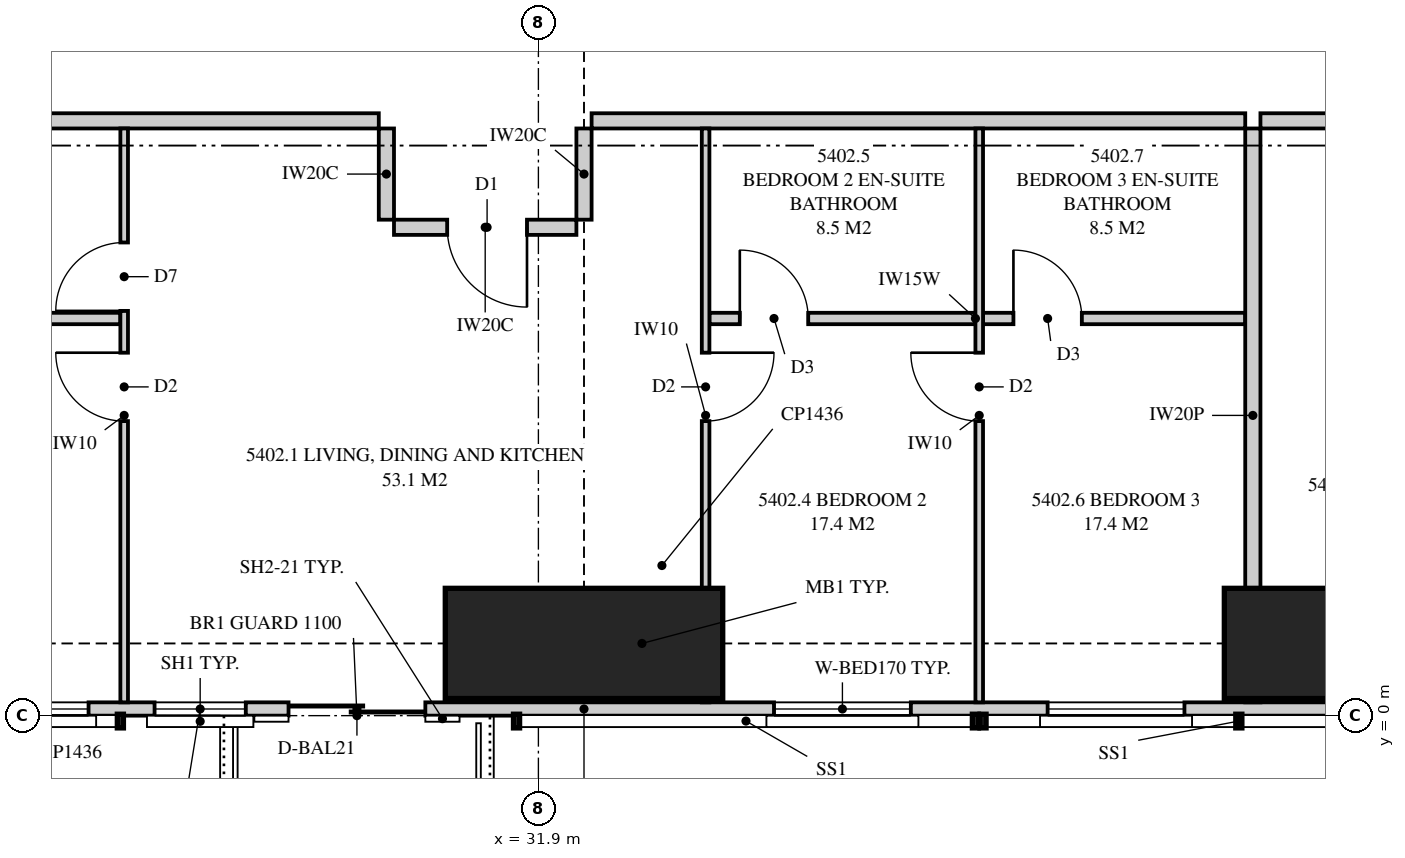
"""IFC4 building model, lengths in metres.
Left out: names, types, materials, properties, quantities, classifications, styles, units other than length and angle.
Written with IfcOpenShell. Run it as: python <this file> out.ifc"""

import sys

from ifc_helpers import new_model, si_unit, direction, frame, frame_2d, origin, origin_2d, place, context, subcontext, project, spatial, polyline, rectangle, outline, extrude, element, fill, save


model = new_model("IFC4")
c1 = context("Model", 3, precision=1e-05, world=origin(), true_north=direction((0.0, 1.0)))
c2 = subcontext(c1, "Body", "Model", "MODEL_VIEW")
j1 = project(units=[si_unit("LENGTHUNIT", "METRE"), si_unit("PLANEANGLEUNIT", "RADIAN")], contexts=[c1])
p1 = place(None, origin())
s1 = spatial("IfcSite", under=j1, at=p1, CompositionType="ELEMENT")
p2 = place(p1, origin())
s2 = spatial("IfcBuilding", under=s1, at=p2, CompositionType="ELEMENT")
p3 = place(p2, frame((0.0, 0.0, 197.9)))
s3 = spatial("IfcBuildingStorey", under=s2, at=p3, CompositionType="ELEMENT", Elevation=197.9)
for number, where, z_axis, x_axis in (
    (1, (32.5, 0.95, 0.0), (0.0, 0.0, 1.0), (0.0, 1.0, 0.0)),
    (2, (42.75, 0.95, 0.0), (0.0, 0.0, 1.0), (0.0, 1.0, 0.0)),
):
    element("IfcColumn", number, at=place(p3, frame(where, z_axis=z_axis, x_axis=x_axis)), inside=s3, PredefinedType="COLUMN", context=c2, shape_type="SweptSolid", body=[
        extrude(rectangle(XDim=1.45, YDim=3.65, at=origin_2d()), origin(), (0.0, 0.0, 1.0), 3.35),
    ])
p4 = place(p3, frame((15.051, 0.087, 0.0), z_axis=(0.0, 0.0, 1.0), x_axis=(1.0, 0.0, 0.0)))
e3 = element("IfcWall", 3, at=p4, inside=s3, PredefinedType="SOLIDWALL", context=c2, shape_type="SweptSolid", body=[
    extrude(outline(polyline([(0.0, 0.0), (34.897, 0.0), (34.897, 3.11), (27.91, 3.11), (27.91, 2.15), (27.836, 2.15), (27.836, 3.11), (27.699, 3.11), (27.699, 2.15), (7.199, 2.15), (7.199, 3.11), (7.062, 3.11), (7.062, 2.15), (6.987, 2.15), (6.987, 3.11), (0.0, 3.11), (0.0, 0.0)])), frame((0.0, 0.087, 0.0), z_axis=(0.0, -1.0, 0.0), x_axis=(1.0, 0.0, 0.0)), (0.0, 0.0, 1.0), 0.175),
])
p5 = place(p4, frame((0.613, 0.0, 0.4)))
e4 = element("IfcOpeningElement", 4, at=p5, cuts=e3, PredefinedType="OPENING", context=c2, shape_type="SweptSolid", body=[
    extrude(rectangle(XDim=1.2, YDim=1.7, at=frame_2d((0.6, 0.85))), frame((0.0, 0.097, 0.0), z_axis=(0.0, -1.0, 0.0), x_axis=(1.0, 0.0, 0.0)), (0.0, 0.0, 1.0), 0.195),
])
p6 = place(p4, frame((3.349, 0.0, 0.4)))
e5 = element("IfcOpeningElement", 5, at=p6, cuts=e3, PredefinedType="OPENING", context=c2, shape_type="SweptSolid", body=[
    extrude(rectangle(XDim=1.8, YDim=1.7, at=frame_2d((0.9, 0.85))), frame((0.0, 0.097, 0.0), z_axis=(0.0, -1.0, 0.0), x_axis=(1.0, 0.0, 0.0)), (0.0, 0.0, 1.0), 0.195),
])
p7 = place(p4, frame((9.13, 0.0, 0.4)))
e6 = element("IfcOpeningElement", 6, at=p7, cuts=e3, PredefinedType="OPENING", context=c2, shape_type="SweptSolid", body=[
    extrude(rectangle(XDim=1.8, YDim=1.7, at=frame_2d((0.9, 0.85))), frame((0.0, 0.097, 0.0), z_axis=(0.0, -1.0, 0.0), x_axis=(1.0, 0.0, 0.0)), (0.0, 0.0, 1.0), 0.195),
])
p8 = place(p4, frame((13.561, 0.0, 0.0)))
e7 = element("IfcOpeningElement", 7, at=p8, cuts=e3, PredefinedType="OPENING", context=c2, shape_type="SweptSolid", body=[
    extrude(rectangle(XDim=1.8, YDim=2.1, at=frame_2d((0.9, 1.05))), frame((0.0, 0.097, 0.0), z_axis=(0.0, -1.0, 0.0), x_axis=(1.0, 0.0, 0.0)), (0.0, 0.0, 1.0), 0.195),
])
p9 = place(p4, frame((11.799, 0.0, 0.4)))
e8 = element("IfcOpeningElement", 8, at=p9, cuts=e3, PredefinedType="OPENING", context=c2, shape_type="SweptSolid", body=[
    extrude(rectangle(XDim=1.2, YDim=1.7, at=frame_2d((0.6, 0.85))), frame((0.0, 0.097, 0.0), z_axis=(0.0, -1.0, 0.0), x_axis=(1.0, 0.0, 0.0)), (0.0, 0.0, 1.0), 0.195),
])
p10 = place(p4, frame((19.949, 0.0, 0.4)))
e9 = element("IfcOpeningElement", 9, at=p10, cuts=e3, PredefinedType="OPENING", context=c2, shape_type="SweptSolid", body=[
    extrude(rectangle(XDim=1.8, YDim=1.7, at=frame_2d((0.9, 0.85))), frame((0.0, 0.097, 0.0), z_axis=(0.0, -1.0, 0.0), x_axis=(1.0, 0.0, 0.0)), (0.0, 0.0, 1.0), 0.195),
])
p11 = place(p4, frame((23.549, 0.0, 0.4)))
e10 = element("IfcOpeningElement", 10, at=p11, cuts=e3, PredefinedType="OPENING", context=c2, shape_type="SweptSolid", body=[
    extrude(rectangle(XDim=1.8, YDim=1.7, at=frame_2d((0.9, 0.85))), frame((0.0, 0.097, 0.0), z_axis=(0.0, -1.0, 0.0), x_axis=(1.0, 0.0, 0.0)), (0.0, 0.0, 1.0), 0.195),
])
p12 = place(p4, frame((29.73, 0.0, 0.4)))
e11 = element("IfcOpeningElement", 11, at=p12, cuts=e3, PredefinedType="OPENING", context=c2, shape_type="SweptSolid", body=[
    extrude(rectangle(XDim=2.4, YDim=1.7, at=frame_2d((1.2, 0.85))), frame((0.0, 0.097, 0.0), z_axis=(0.0, -1.0, 0.0), x_axis=(1.0, 0.0, 0.0)), (0.0, 0.0, 1.0), 0.195),
])
p13 = place(p3, frame((41.3, 0.175, 0.0), z_axis=(0.0, 0.0, 1.0), x_axis=(0.0, 1.0, 0.0)))
e12 = element("IfcWall", 12, at=p13, inside=s3, PredefinedType="PARTITIONING", context=c2, shape_type="SweptSolid", body=[
    extrude(outline(polyline([(0.529, 2.15), (0.0, 2.15), (0.0, 0.0), (0.529, 0.0), (0.529, 0.032), (1.021, 0.032), (1.021, 0.0), (7.55, 0.0), (7.55, 3.11), (1.685, 3.11), (1.685, 2.15), (1.021, 2.15), (1.021, 2.118), (0.529, 2.118), (0.529, 2.15)])), frame((0.0, 0.1, 0.0), z_axis=(0.0, -1.0, 0.0), x_axis=(1.0, 0.0, 0.0)), (0.0, 0.0, 1.0), 0.2),
])
p14 = place(p3, frame((21.2, 7.825, 0.0), z_axis=(0.0, 0.0, 1.0), x_axis=(1.0, 0.0, 0.0)))
e13 = element("IfcWall", 13, at=p14, inside=s3, PredefinedType="PARTITIONING", context=c2, shape_type="SweptSolid", body=[
    extrude(outline(polyline([(0.0, 0.0), (8.6, 0.0), (8.6, 3.11), (1.387, 3.11), (1.387, 2.541), (0.713, 2.541), (0.713, 3.11), (0.0, 3.11), (0.0, 0.0)])), frame((0.0, 0.1, 0.0), z_axis=(0.0, -1.0, 0.0), x_axis=(1.0, 0.0, 0.0)), (0.0, 0.0, 1.0), 0.2),
])
p15 = place(p3, frame((26.45, 0.175, 0.0), z_axis=(0.0, 0.0, 1.0), x_axis=(0.0, 1.0, 0.0)))
e14 = element("IfcWall", 14, at=p15, inside=s3, PredefinedType="PARTITIONING", context=c2, shape_type="SweptSolid", body=[
    extrude(outline(polyline([(0.0, 0.0), (7.55, 0.0), (7.55, 3.11), (1.635, 3.11), (1.635, 2.15), (0.0, 2.15), (0.0, 3.11), (0.0, 0.0)])), frame((0.0, 0.05, 0.0), z_axis=(0.0, -1.0, 0.0), x_axis=(1.0, 0.0, 0.0)), (0.0, 0.0, 1.0), 0.1),
])
p16 = place(p15, frame((3.7, 0.0, 0.0)))
e15 = element("IfcOpeningElement", 15, at=p16, cuts=e14, PredefinedType="OPENING", context=c2, shape_type="SweptSolid", body=[
    extrude(rectangle(XDim=0.9, YDim=2.1, at=frame_2d((0.45, 1.05))), frame((0.0, 0.06, 0.0), z_axis=(0.0, -1.0, 0.0), x_axis=(1.0, 0.0, 0.0)), (0.0, 0.0, 1.0), 0.12),
])
p17 = place(p15, frame((5.15, 0.0, 0.0)))
e16 = element("IfcOpeningElement", 16, at=p17, cuts=e14, PredefinedType="OPENING", context=c2, shape_type="SweptSolid", body=[
    extrude(rectangle(XDim=0.9, YDim=2.1, at=frame_2d((0.45, 1.05))), frame((0.0, 0.06, 0.0), z_axis=(0.0, -1.0, 0.0), x_axis=(1.0, 0.0, 0.0)), (0.0, 0.0, 1.0), 0.12),
])
p18 = place(p3, frame((34.1, 0.175, 0.0), z_axis=(0.0, 0.0, 1.0), x_axis=(0.0, 1.0, 0.0)))
e17 = element("IfcWall", 17, at=p18, inside=s3, PredefinedType="PARTITIONING", context=c2, shape_type="SweptSolid", body=[
    extrude(outline(polyline([(0.0, 0.0), (7.55, 0.0), (7.55, 3.11), (1.635, 3.11), (1.635, 2.15), (0.0, 2.15), (0.0, 3.11), (0.0, 0.0)])), frame((0.0, 0.05, 0.0), z_axis=(0.0, -1.0, 0.0), x_axis=(1.0, 0.0, 0.0)), (0.0, 0.0, 1.0), 0.1),
])
p19 = place(p18, frame((3.7, 0.0, 0.0)))
e18 = element("IfcOpeningElement", 18, at=p19, cuts=e17, PredefinedType="OPENING", context=c2, shape_type="SweptSolid", body=[
    extrude(rectangle(XDim=0.9, YDim=2.1, at=frame_2d((0.45, 1.05))), frame((0.0, 0.06, 0.0), z_axis=(0.0, -1.0, 0.0), x_axis=(1.0, 0.0, 0.0)), (0.0, 0.0, 1.0), 0.12),
])
p20 = place(p3, frame((37.7, 0.175, 0.0), z_axis=(0.0, 0.0, 1.0), x_axis=(0.0, 1.0, 0.0)))
e19 = element("IfcWall", 19, at=p20, inside=s3, PredefinedType="PARTITIONING", context=c2, shape_type="SweptSolid", body=[
    extrude(outline(polyline([(0.0, 0.0), (7.55, 0.0), (7.55, 3.11), (1.635, 3.11), (1.635, 2.15), (0.0, 2.15), (0.0, 3.11), (0.0, 0.0)])), frame((0.0, 0.05, 0.0), z_axis=(0.0, -1.0, 0.0), x_axis=(1.0, 0.0, 0.0)), (0.0, 0.0, 1.0), 0.1),
])
p21 = place(p20, frame((3.7, 0.0, 0.0)))
e20 = element("IfcOpeningElement", 20, at=p21, cuts=e19, PredefinedType="OPENING", context=c2, shape_type="SweptSolid", body=[
    extrude(rectangle(XDim=0.9, YDim=2.1, at=frame_2d((0.45, 1.05))), frame((0.0, 0.06, 0.0), z_axis=(0.0, -1.0, 0.0), x_axis=(1.0, 0.0, 0.0)), (0.0, 0.0, 1.0), 0.12),
])
p22 = place(p3, frame((21.2, 5.225, 0.0), z_axis=(0.0, 0.0, 1.0), x_axis=(1.0, 0.0, 0.0)))
e21 = element("IfcWall", 21, at=p22, inside=s3, PredefinedType="PLUMBINGWALL", context=c2, shape_type="SweptSolid", body=[
    extrude(outline(polyline([(0.0, 0.0), (5.2, 0.0), (5.2, 3.11), (1.362, 3.11), (1.362, 2.541), (0.738, 2.541), (0.738, 3.11), (0.0, 3.11), (0.0, 0.0)])), frame((0.0, 0.075, 0.0), z_axis=(0.0, -1.0, 0.0), x_axis=(1.0, 0.0, 0.0)), (0.0, 0.0, 1.0), 0.15),
])
p23 = place(p3, frame((34.15, 5.225, 0.0), z_axis=(0.0, 0.0, 1.0), x_axis=(1.0, 0.0, 0.0)))
e22 = element("IfcWall", 22, at=p23, inside=s3, PredefinedType="PLUMBINGWALL", context=c2, shape_type="SweptSolid", body=[
    extrude(rectangle(XDim=3.5, YDim=0.15, at=frame_2d((1.75, 0.0))), origin(), (0.0, 0.0, 1.0), 3.11),
])
p24 = place(p23, frame((0.4, 0.0, 0.0)))
e23 = element("IfcOpeningElement", 23, at=p24, cuts=e22, PredefinedType="OPENING", context=c2, shape_type="SweptSolid", body=[
    extrude(rectangle(XDim=0.9, YDim=2.1, at=frame_2d((0.45, 1.05))), frame((0.0, 0.085, 0.0), z_axis=(0.0, -1.0, 0.0), x_axis=(1.0, 0.0, 0.0)), (0.0, 0.0, 1.0), 0.17),
])
p25 = place(p3, frame((37.75, 5.225, 0.0), z_axis=(0.0, 0.0, 1.0), x_axis=(1.0, 0.0, 0.0)))
e24 = element("IfcWall", 24, at=p25, inside=s3, PredefinedType="PLUMBINGWALL", context=c2, shape_type="SweptSolid", body=[
    extrude(rectangle(XDim=3.45, YDim=0.15, at=frame_2d((1.725, 0.0))), origin(), (0.0, 0.0, 1.0), 3.11),
])
p26 = place(p25, frame((0.4, 0.0, 0.0)))
e25 = element("IfcOpeningElement", 25, at=p26, cuts=e24, PredefinedType="OPENING", context=c2, shape_type="SweptSolid", body=[
    extrude(rectangle(XDim=0.9, YDim=2.1, at=frame_2d((0.45, 1.05))), frame((0.0, 0.085, 0.0), z_axis=(0.0, -1.0, 0.0), x_axis=(1.0, 0.0, 0.0)), (0.0, 0.0, 1.0), 0.17),
])
p27 = place(p3, frame((41.4, 7.825, 0.0), z_axis=(0.0, 0.0, 1.0), x_axis=(1.0, 0.0, 0.0)))
e26 = element("IfcWall", 26, at=p27, inside=s3, PredefinedType="PARTITIONING", context=c2, shape_type="SweptSolid", body=[
    extrude(outline(polyline([(0.0, 0.0), (4.55, 0.0), (4.55, 3.11), (1.688, 3.11), (1.688, 2.541), (1.013, 2.541), (1.013, 3.11), (0.0, 3.11), (0.0, 0.0)])), frame((0.0, 0.1, 0.0), z_axis=(0.0, -1.0, 0.0), x_axis=(1.0, 0.0, 0.0)), (0.0, 0.0, 1.0), 0.2),
])
p28 = place(p27, frame((3.35, 0.0, 0.0)))
e27 = element("IfcOpeningElement", 27, at=p28, cuts=e26, PredefinedType="OPENING", context=c2, shape_type="SweptSolid", body=[
    extrude(rectangle(XDim=1.05, YDim=2.2, at=frame_2d((0.525, 1.1))), frame((0.0, 0.11, 0.0), z_axis=(0.0, -1.0, 0.0), x_axis=(1.0, 0.0, 0.0)), (0.0, 0.0, 1.0), 0.22),
])
p29 = place(p3, frame((32.6, 7.825, 0.0), z_axis=(0.0, 0.0, 1.0), x_axis=(1.0, 0.0, 0.0)))
e28 = element("IfcWall", 28, at=p29, inside=s3, PredefinedType="PARTITIONING", context=c2, shape_type="SweptSolid", body=[
    extrude(outline(polyline([(0.0, 0.0), (8.6, 0.0), (8.6, 3.11), (0.237, 3.11), (0.237, 2.541), (0.0, 2.541), (0.0, 3.11), (0.0, 0.0)])), frame((0.0, 0.1, 0.0), z_axis=(0.0, -1.0, 0.0), x_axis=(1.0, 0.0, 0.0)), (0.0, 0.0, 1.0), 0.2),
])
p30 = place(p3, frame((30.0, 6.425, 0.0), z_axis=(0.0, 0.0, 1.0), x_axis=(1.0, 0.0, 0.0)))
e29 = element("IfcWall", 29, at=p30, inside=s3, PredefinedType="PARTITIONING", context=c2, shape_type="SweptSolid", body=[
    extrude(outline(polyline([(0.0, 0.0), (2.4, 0.0), (2.4, 3.11), (2.4, 2.541), (2.163, 2.541), (2.163, 3.11), (0.0, 3.11), (0.0, 0.0)])), frame((0.0, 0.1, 0.0), z_axis=(0.0, -1.0, 0.0), x_axis=(1.0, 0.0, 0.0)), (0.0, 0.0, 1.0), 0.2),
])
p31 = place(p30, frame((0.7, 0.0, 0.0)))
e30 = element("IfcOpeningElement", 30, at=p31, cuts=e29, PredefinedType="OPENING", context=c2, shape_type="SweptSolid", body=[
    extrude(rectangle(XDim=1.05, YDim=2.2, at=frame_2d((0.525, 1.1))), frame((0.0, 0.11, 0.0), z_axis=(0.0, -1.0, 0.0), x_axis=(1.0, 0.0, 0.0)), (0.0, 0.0, 1.0), 0.22),
])
p32 = place(p3, frame((29.9, 7.725, 0.0), z_axis=(0.0, 0.0, 1.0), x_axis=(0.0, -1.0, 0.0)))
e31 = element("IfcWall", 31, at=p32, inside=s3, PredefinedType="PARTITIONING", context=c2, shape_type="SweptSolid", body=[
    extrude(rectangle(XDim=1.2, YDim=0.2, at=frame_2d((0.6, 0.0))), origin(), (0.0, 0.0, 1.0), 3.11),
])
p33 = place(p3, frame((32.5, 7.725, 0.0), z_axis=(0.0, 0.0, 1.0), x_axis=(0.0, -1.0, 0.0)))
e32 = element("IfcWall", 32, at=p33, inside=s3, PredefinedType="PARTITIONING", context=c2, shape_type="SweptSolid", body=[
    extrude(outline(polyline([(0.0, 0.0), (1.2, 0.0), (1.2, 3.11), (1.2, 2.541), (0.0, 2.541), (0.0, 3.11), (0.0, 0.0)])), frame((0.0, 0.1, 0.0), z_axis=(0.0, -1.0, 0.0), x_axis=(1.0, 0.0, 0.0)), (0.0, 0.0, 1.0), 0.2),
])
p34 = place(p7, origin())
e33 = element("IfcWindow", 33, at=p34, inside=s3, PartitioningType="SINGLE_PANEL", PredefinedType="WINDOW", context=c2, shape_type="SweptSolid", body=[
    extrude(rectangle(XDim=1.8, YDim=1.7, at=frame_2d((0.9, 0.85))), frame((0.0, 0.03, 0.0), z_axis=(0.0, -1.0, 0.0), x_axis=(1.0, 0.0, 0.0)), (0.0, 0.0, 1.0), 0.06),
])
fill(e6, e33)
p35 = place(p8, origin())
e34 = element("IfcDoor", 34, at=p35, inside=s3, OperationType="SLIDING_TO_LEFT", PredefinedType="DOOR", context=c2, shape_type="SweptSolid", body=[
    extrude(rectangle(XDim=1.8, YDim=2.1, at=frame_2d((0.9, 1.05))), frame((0.0, 0.025, 0.0), z_axis=(0.0, -1.0, 0.0), x_axis=(1.0, 0.0, 0.0)), (0.0, 0.0, 1.0), 0.05),
])
fill(e7, e34)
p36 = place(p9, origin())
e35 = element("IfcWindow", 35, at=p36, inside=s3, PartitioningType="SINGLE_PANEL", PredefinedType="WINDOW", context=c2, shape_type="SweptSolid", body=[
    extrude(rectangle(XDim=1.2, YDim=1.7, at=frame_2d((0.6, 0.85))), frame((0.0, 0.03, 0.0), z_axis=(0.0, -1.0, 0.0), x_axis=(1.0, 0.0, 0.0)), (0.0, 0.0, 1.0), 0.06),
])
fill(e8, e35)
p37 = place(p10, origin())
e36 = element("IfcWindow", 36, at=p37, inside=s3, PartitioningType="SINGLE_PANEL", PredefinedType="WINDOW", context=c2, shape_type="SweptSolid", body=[
    extrude(rectangle(XDim=1.8, YDim=1.7, at=frame_2d((0.9, 0.85))), frame((0.0, 0.03, 0.0), z_axis=(0.0, -1.0, 0.0), x_axis=(1.0, 0.0, 0.0)), (0.0, 0.0, 1.0), 0.06),
])
fill(e9, e36)
p38 = place(p11, origin())
e37 = element("IfcWindow", 37, at=p38, inside=s3, PartitioningType="SINGLE_PANEL", PredefinedType="WINDOW", context=c2, shape_type="SweptSolid", body=[
    extrude(rectangle(XDim=1.8, YDim=1.7, at=frame_2d((0.9, 0.85))), frame((0.0, 0.03, 0.0), z_axis=(0.0, -1.0, 0.0), x_axis=(1.0, 0.0, 0.0)), (0.0, 0.0, 1.0), 0.06),
])
fill(e10, e37)
p39 = place(p31, frame((1.05, 0.0, 0.0), z_axis=(0.0, 0.0, 1.0), x_axis=(-1.0, 0.0, 0.0)))
e38 = element("IfcDoor", 38, at=p39, inside=s3, OperationType="SINGLE_SWING_LEFT", PredefinedType="DOOR", context=c2, shape_type="SweptSolid", body=[
    extrude(rectangle(XDim=1.05, YDim=2.2, at=frame_2d((0.525, 1.1))), frame((0.0, 0.025, 0.0), z_axis=(0.0, -1.0, 0.0), x_axis=(1.0, 0.0, 0.0)), (0.0, 0.0, 1.0), 0.05),
])
fill(e30, e38)
p40 = place(p16, origin())
e39 = element("IfcDoor", 39, at=p40, inside=s3, OperationType="SINGLE_SWING_RIGHT", PredefinedType="DOOR", context=c2, shape_type="SweptSolid", body=[
    extrude(rectangle(XDim=0.9, YDim=2.1, at=frame_2d((0.45, 1.05))), frame((0.0, 0.025, 0.0), z_axis=(0.0, -1.0, 0.0), x_axis=(1.0, 0.0, 0.0)), (0.0, 0.0, 1.0), 0.05),
])
fill(e15, e39)
p41 = place(p17, origin())
e40 = element("IfcDoor", 40, at=p41, inside=s3, OperationType="SINGLE_SWING_LEFT", PredefinedType="DOOR", context=c2, shape_type="SweptSolid", body=[
    extrude(rectangle(XDim=0.9, YDim=2.1, at=frame_2d((0.45, 1.05))), frame((0.0, 0.025, 0.0), z_axis=(0.0, -1.0, 0.0), x_axis=(1.0, 0.0, 0.0)), (0.0, 0.0, 1.0), 0.05),
])
fill(e16, e40)
p42 = place(p19, frame((0.9, 0.0, 0.0), z_axis=(0.0, 0.0, 1.0), x_axis=(-1.0, 0.0, 0.0)))
e41 = element("IfcDoor", 41, at=p42, inside=s3, OperationType="SINGLE_SWING_LEFT", PredefinedType="DOOR", context=c2, shape_type="SweptSolid", body=[
    extrude(rectangle(XDim=0.9, YDim=2.1, at=frame_2d((0.45, 1.05))), frame((0.0, 0.025, 0.0), z_axis=(0.0, -1.0, 0.0), x_axis=(1.0, 0.0, 0.0)), (0.0, 0.0, 1.0), 0.05),
])
fill(e18, e41)
p43 = place(p24, origin())
e42 = element("IfcDoor", 42, at=p43, inside=s3, OperationType="SINGLE_SWING_LEFT", PredefinedType="DOOR", context=c2, shape_type="SweptSolid", body=[
    extrude(rectangle(XDim=0.9, YDim=2.1, at=frame_2d((0.45, 1.05))), frame((0.0, 0.025, 0.0), z_axis=(0.0, -1.0, 0.0), x_axis=(1.0, 0.0, 0.0)), (0.0, 0.0, 1.0), 0.05),
])
fill(e23, e42)
p44 = place(p21, origin())
e43 = element("IfcDoor", 43, at=p44, inside=s3, OperationType="SINGLE_SWING_RIGHT", PredefinedType="DOOR", context=c2, shape_type="SweptSolid", body=[
    extrude(rectangle(XDim=0.9, YDim=2.1, at=frame_2d((0.45, 1.05))), frame((0.0, 0.025, 0.0), z_axis=(0.0, -1.0, 0.0), x_axis=(1.0, 0.0, 0.0)), (0.0, 0.0, 1.0), 0.05),
])
fill(e20, e43)
p45 = place(p26, origin())
e44 = element("IfcDoor", 44, at=p45, inside=s3, OperationType="SINGLE_SWING_LEFT", PredefinedType="DOOR", context=c2, shape_type="SweptSolid", body=[
    extrude(rectangle(XDim=0.9, YDim=2.1, at=frame_2d((0.45, 1.05))), frame((0.0, 0.025, 0.0), z_axis=(0.0, -1.0, 0.0), x_axis=(1.0, 0.0, 0.0)), (0.0, 0.0, 1.0), 0.05),
])
fill(e25, e44)
save(model, sys.argv[1])
